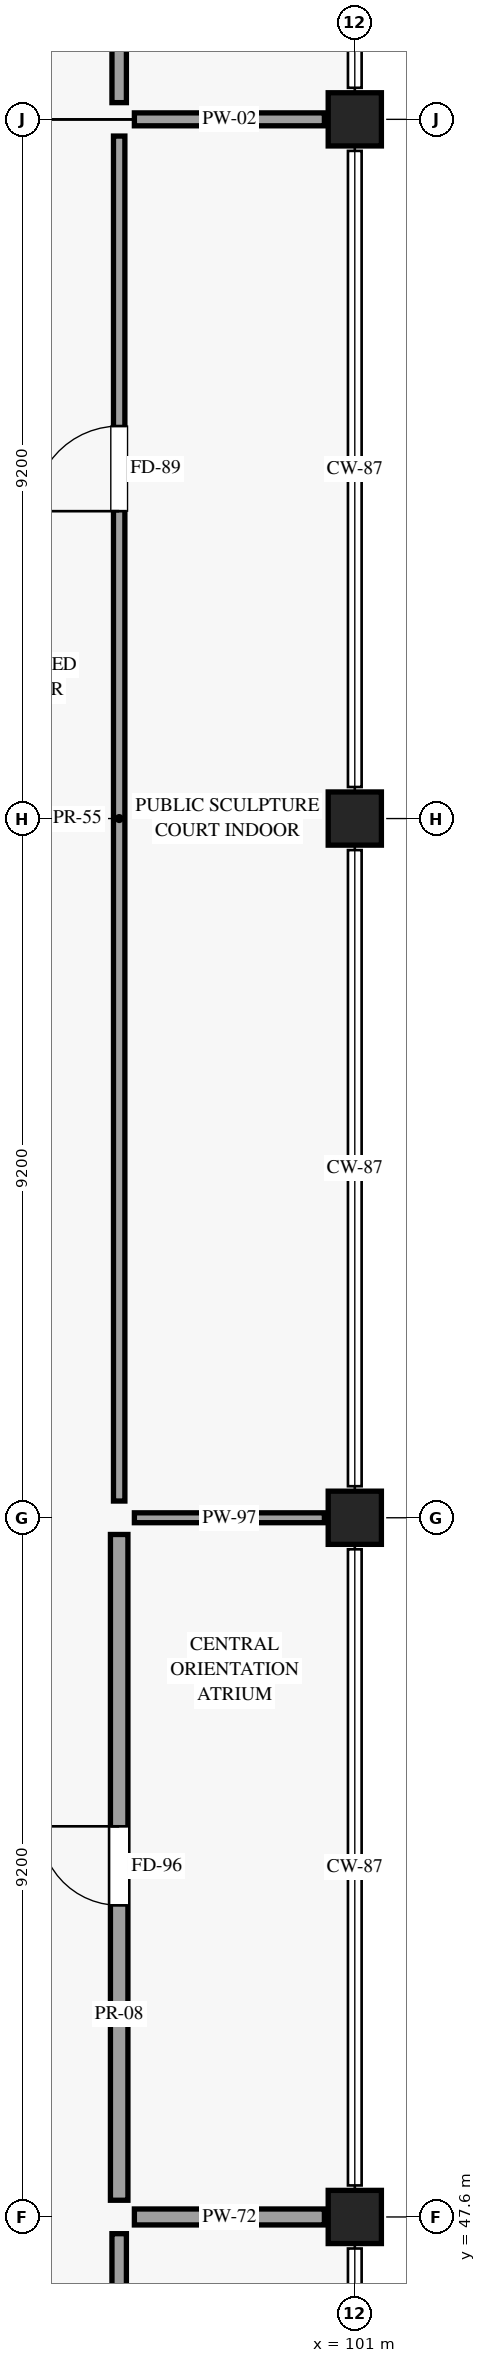
"""IFC4 building model, lengths in metres.
Left out: names, types, materials, properties, quantities, classifications, styles, units other than length and angle.
Written with IfcOpenShell. Run it as: python <this file> out.ifc"""

import sys

from ifc_helpers import new_model, si_unit, direction, frame, frame_2d, origin, origin_2d, place, context, subcontext, project, spatial, rectangle, extrude, element, fill, save


model = new_model("IFC4")
c1 = context("Model", 3, precision=1e-05, world=origin(), true_north=direction((0.0, 1.0)))
c2 = subcontext(c1, "Body", "Model", "MODEL_VIEW")
j1 = project(units=[si_unit("LENGTHUNIT", "METRE"), si_unit("PLANEANGLEUNIT", "RADIAN")], contexts=[c1])
p1 = place(None, origin())
s1 = spatial("IfcSite", under=j1, at=p1, CompositionType="ELEMENT")
p2 = place(p1, origin())
s2 = spatial("IfcBuilding", under=s1, at=p2, CompositionType="ELEMENT")
p3 = place(p2, origin())
s3 = spatial("IfcBuildingStorey", under=s2, at=p3, CompositionType="ELEMENT", Elevation=0.0)
for number, where, z_axis, x_axis in (
    (1, (101.0, 47.6, 0.0), (0.0, 0.0, 1.0), (1.0, 0.0, 0.0)),
    (2, (101.0, 56.8, 0.0), (0.0, 0.0, 1.0), (1.0, 0.0, 0.0)),
    (3, (101.0, 66.0, 0.0), (0.0, 0.0, 1.0), (1.0, 0.0, 0.0)),
    (4, (101.0, 75.2, 0.0), (0.0, 0.0, 1.0), (1.0, 0.0, 0.0)),
):
    element("IfcColumn", number, at=place(p3, frame(where, z_axis=z_axis, x_axis=x_axis)), inside=s3, PredefinedType="COLUMN", context=c2, shape_type="SweptSolid", body=[
        extrude(rectangle(XDim=0.7, YDim=0.7, at=origin_2d()), origin(), (0.0, 0.0, 1.0), 5.4),
    ])
p4 = place(p3, frame((97.9, 38.94, 0.0), z_axis=(0.0, 0.0, 1.0), x_axis=(0.0, 1.0, 0.0)))
e5 = element("IfcWall", 5, at=p4, inside=s3, PredefinedType="PARTITIONING", context=c2, shape_type="SweptSolid", body=[
    extrude(rectangle(XDim=8.44, YDim=0.19, at=frame_2d((4.22, 0.0))), origin(), (0.0, 0.0, 1.0), 4.195),
])
p5 = place(p4, frame((3.368, 0.0, 0.0)))
e6 = element("IfcOpeningElement", 6, at=p5, cuts=e5, PredefinedType="OPENING", context=c2, shape_type="SweptSolid", body=[
    extrude(rectangle(XDim=1.5, YDim=2.35, at=frame_2d((0.75, 1.175))), frame((0.0, 0.105, 0.0), z_axis=(0.0, -1.0, 0.0), x_axis=(1.0, 0.0, 0.0)), (0.0, 0.0, 1.0), 0.21),
])
p6 = place(p3, frame((98.1, 47.6, 0.0), z_axis=(0.0, 0.0, 1.0), x_axis=(1.0, 0.0, 0.0)))
e7 = element("IfcWall", 7, at=p6, inside=s3, PredefinedType="PARTITIONING", context=c2, shape_type="SweptSolid", body=[
    extrude(rectangle(XDim=2.5, YDim=0.21, at=frame_2d((1.25, 0.0))), origin(), (0.0, 0.0, 1.0), 4.195),
])
p7 = place(p3, frame((97.9, 47.82, 0.0), z_axis=(0.0, 0.0, 1.0), x_axis=(0.0, 1.0, 0.0)))
e8 = element("IfcWall", 8, at=p7, inside=s3, PredefinedType="PARTITIONING", context=c2, shape_type="SweptSolid", body=[
    extrude(rectangle(XDim=8.76, YDim=0.23, at=frame_2d((4.38, 0.0))), origin(), (0.0, 0.0, 1.0), 4.195),
])
p8 = place(p7, frame((3.88, 0.0, 0.0)))
e9 = element("IfcOpeningElement", 9, at=p8, cuts=e8, PredefinedType="OPENING", context=c2, shape_type="SweptSolid", body=[
    extrude(rectangle(XDim=1.04, YDim=2.22, at=frame_2d((0.52, 1.11))), frame((0.0, 0.125, 0.0), z_axis=(0.0, -1.0, 0.0), x_axis=(1.0, 0.0, 0.0)), (0.0, 0.0, 1.0), 0.25),
])
p9 = place(p3, frame((98.1, 56.8, 0.0), z_axis=(0.0, 0.0, 1.0), x_axis=(1.0, 0.0, 0.0)))
e10 = element("IfcWall", 10, at=p9, inside=s3, PredefinedType="PARTITIONING", context=c2, shape_type="SweptSolid", body=[
    extrude(rectangle(XDim=2.5, YDim=0.13, at=frame_2d((1.25, 0.0))), origin(), (0.0, 0.0, 1.0), 4.195),
])
p10 = place(p3, frame((97.9, 57.02, 0.0), z_axis=(0.0, 0.0, 1.0), x_axis=(0.0, 1.0, 0.0)))
e11 = element("IfcWall", 11, at=p10, inside=s3, PredefinedType="PARTITIONING", context=c2, shape_type="SweptSolid", body=[
    extrude(rectangle(XDim=17.96, YDim=0.15, at=frame_2d((8.98, 0.0))), origin(), (0.0, 0.0, 1.0), 4.195),
])
p11 = place(p10, frame((13.024, 0.0, 0.0)))
e12 = element("IfcOpeningElement", 12, at=p11, cuts=e11, PredefinedType="OPENING", context=c2, shape_type="SweptSolid", body=[
    extrude(rectangle(XDim=1.12, YDim=2.26, at=frame_2d((0.56, 1.13))), frame((0.0, 0.085, 0.0), z_axis=(0.0, -1.0, 0.0), x_axis=(1.0, 0.0, 0.0)), (0.0, 0.0, 1.0), 0.17),
])
p12 = place(p3, frame((98.1, 75.2, 0.0), z_axis=(0.0, 0.0, 1.0), x_axis=(1.0, 0.0, 0.0)))
e13 = element("IfcWall", 13, at=p12, inside=s3, PredefinedType="PARTITIONING", context=c2, shape_type="SweptSolid", body=[
    extrude(rectangle(XDim=2.5, YDim=0.17, at=frame_2d((1.25, 0.0))), origin(), (0.0, 0.0, 1.0), 4.195),
])
p13 = place(p3, frame((97.9, 75.42, 0.0), z_axis=(0.0, 0.0, 1.0), x_axis=(0.0, 1.0, 0.0)))
e14 = element("IfcWall", 14, at=p13, inside=s3, PredefinedType="PARTITIONING", context=c2, shape_type="SweptSolid", body=[
    extrude(rectangle(XDim=8.76, YDim=0.19, at=frame_2d((4.38, 0.0))), origin(), (0.0, 0.0, 1.0), 4.195),
])
p14 = place(p13, frame((3.88, 0.0, 0.0)))
e15 = element("IfcOpeningElement", 15, at=p14, cuts=e14, PredefinedType="OPENING", context=c2, shape_type="SweptSolid", body=[
    extrude(rectangle(XDim=1.2, YDim=2.3, at=frame_2d((0.6, 1.15))), frame((0.0, 0.105, 0.0), z_axis=(0.0, -1.0, 0.0), x_axis=(1.0, 0.0, 0.0)), (0.0, 0.0, 1.0), 0.21),
])
p15 = place(p8, origin())
e16 = element("IfcDoor", 16, at=p15, inside=s3, OperationType="SINGLE_SWING_RIGHT", PredefinedType="DOOR", context=c2, shape_type="SweptSolid", body=[
    extrude(rectangle(XDim=1.04, YDim=2.22, at=frame_2d((0.52, 1.11))), frame((0.0, 0.025, 0.0), z_axis=(0.0, -1.0, 0.0), x_axis=(1.0, 0.0, 0.0)), (0.0, 0.0, 1.0), 0.05),
])
fill(e9, e16)
p16 = place(p11, origin())
e17 = element("IfcDoor", 17, at=p16, inside=s3, OperationType="SINGLE_SWING_LEFT", PredefinedType="DOOR", context=c2, shape_type="SweptSolid", body=[
    extrude(rectangle(XDim=1.12, YDim=2.26, at=frame_2d((0.56, 1.13))), frame((0.0, 0.025, 0.0), z_axis=(0.0, -1.0, 0.0), x_axis=(1.0, 0.0, 0.0)), (0.0, 0.0, 1.0), 0.05),
])
fill(e12, e17)
save(model, sys.argv[1])
